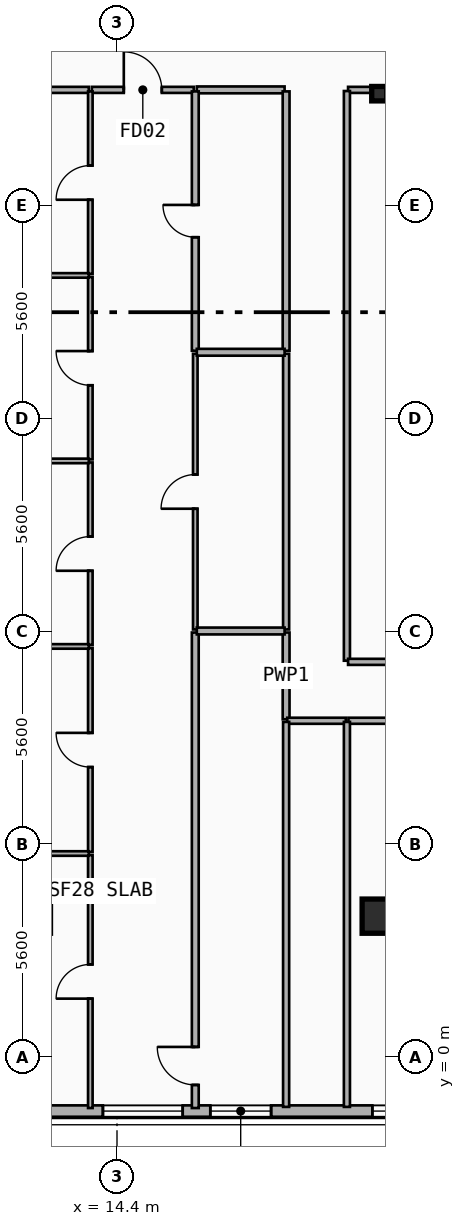
"""IFC4 building model, lengths in metres.
Left out: names, types, materials, properties, quantities, classifications, styles, units other than length and angle.
Written with IfcOpenShell. Run it as: python <this file> out.ifc"""

import sys

from ifc_helpers import new_model, si_unit, direction, frame, frame_2d, origin, origin_2d, place, context, subcontext, project, spatial, rectangle, i_section, extrude, element, fill, save


model = new_model("IFC4")
c1 = context("Model", 3, precision=1e-05, world=origin(), true_north=direction((0.0, 1.0)))
c2 = subcontext(c1, "Body", "Model", "MODEL_VIEW")
j1 = project(units=[si_unit("LENGTHUNIT", "METRE"), si_unit("PLANEANGLEUNIT", "RADIAN")], contexts=[c1])
p1 = place(None, origin())
s1 = spatial("IfcSite", under=j1, at=p1, CompositionType="ELEMENT")
p2 = place(p1, origin())
s2 = spatial("IfcBuilding", under=s1, at=p2, CompositionType="ELEMENT")
p3 = place(p2, frame((0.0, 0.0, 247.3)))
s3 = spatial("IfcBuildingStorey", under=s2, at=p3, CompositionType="ELEMENT", Elevation=247.3)
p4 = place(p3, frame((21.3, 25.35, 0.0), z_axis=(0.0, 0.0, 1.0), x_axis=(1.0, 0.0, 0.0)))
e1 = element("IfcColumn", 1, at=p4, inside=s3, PredefinedType="COLUMN", context=c2, shape_type="SweptSolid", body=[
    extrude(i_section(OverallWidth=0.395, OverallDepth=0.38, WebThickness=0.019, FlangeThickness=0.03, FilletRadius=0.015, at=origin_2d()), origin(), (0.0, 0.0, 1.0), 3.7),
])
p5 = place(p3, frame((21.3, 3.818, 0.0), z_axis=(0.0, -0.090227632116, 0.995921168769), x_axis=(1.0, 0.0, 0.0)))
e2 = element("IfcColumn", 2, at=p5, inside=s3, PredefinedType="COLUMN", context=c2, shape_type="SweptSolid", body=[
    extrude(rectangle(XDim=0.9, YDim=0.9, at=origin_2d()), origin(), (0.0, 0.0, 1.0), 3.715),
])
p6 = place(p3, frame((45.2, -1.42, 0.0), z_axis=(0.0, 0.0, 1.0), x_axis=(-1.0, 0.0, 0.0)))
e3 = element("IfcWall", 3, at=p6, inside=s3, PredefinedType="SOLIDWALL", context=c2, shape_type="SweptSolid", body=[
    extrude(rectangle(XDim=32.8, YDim=0.3, at=frame_2d((16.4, 0.0))), origin(), (0.0, 0.0, 1.0), 3.42),
])
p7 = place(p6, frame((29.071, 0.0, 0.75)))
e4 = element("IfcOpeningElement", 4, at=p7, cuts=e3, PredefinedType="OPENING", context=c2, shape_type="SweptSolid", body=[
    extrude(rectangle(XDim=2.1, YDim=2.1, at=frame_2d((1.05, 1.05))), frame((0.0, 0.16, 0.0), z_axis=(0.0, -1.0, 0.0), x_axis=(1.0, 0.0, 0.0)), (0.0, 0.0, 1.0), 0.32),
])
p8 = place(p6, frame((26.745, 0.0, 0.75)))
e5 = element("IfcOpeningElement", 5, at=p8, cuts=e3, PredefinedType="OPENING", context=c2, shape_type="SweptSolid", body=[
    extrude(rectangle(XDim=1.6, YDim=1.95, at=frame_2d((0.8, 0.975))), frame((0.0, 0.16, 0.0), z_axis=(0.0, -1.0, 0.0), x_axis=(1.0, 0.0, 0.0)), (0.0, 0.0, 1.0), 0.32),
])
p9 = place(p6, frame((21.981, 0.0, 0.75)))
e6 = element("IfcOpeningElement", 6, at=p9, cuts=e3, PredefinedType="OPENING", context=c2, shape_type="SweptSolid", body=[
    extrude(rectangle(XDim=2.1, YDim=2.1, at=frame_2d((1.05, 1.05))), frame((0.0, 0.16, 0.0), z_axis=(0.0, -1.0, 0.0), x_axis=(1.0, 0.0, 0.0)), (0.0, 0.0, 1.0), 0.32),
])
p10 = place(p6, frame((18.324, 0.0, 0.75)))
e7 = element("IfcOpeningElement", 7, at=p10, cuts=e3, PredefinedType="OPENING", context=c2, shape_type="SweptSolid", body=[
    extrude(rectangle(XDim=2.1, YDim=2.1, at=frame_2d((1.05, 1.05))), frame((0.0, 0.16, 0.0), z_axis=(0.0, -1.0, 0.0), x_axis=(1.0, 0.0, 0.0)), (0.0, 0.0, 1.0), 0.32),
])
p11 = place(p6, frame((11.364, 0.0, 0.75)))
e8 = element("IfcOpeningElement", 8, at=p11, cuts=e3, PredefinedType="OPENING", context=c2, shape_type="SweptSolid", body=[
    extrude(rectangle(XDim=2.1, YDim=2.1, at=frame_2d((1.05, 1.05))), frame((0.0, 0.16, 0.0), z_axis=(0.0, -1.0, 0.0), x_axis=(1.0, 0.0, 0.0)), (0.0, 0.0, 1.0), 0.32),
])
p12 = place(p6, frame((9.238, 0.0, 0.68)))
e9 = element("IfcOpeningElement", 9, at=p12, cuts=e3, PredefinedType="OPENING", context=c2, shape_type="SweptSolid", body=[
    extrude(rectangle(XDim=1.2, YDim=1.5, at=frame_2d((0.6, 0.75))), frame((0.0, 0.16, 0.0), z_axis=(0.0, -1.0, 0.0), x_axis=(1.0, 0.0, 0.0)), (0.0, 0.0, 1.0), 0.32),
])
p13 = place(p6, frame((14.669, 0.0, 0.75)))
e10 = element("IfcOpeningElement", 10, at=p13, cuts=e3, PredefinedType="OPENING", context=c2, shape_type="SweptSolid", body=[
    extrude(rectangle(XDim=2.1, YDim=2.1, at=frame_2d((1.05, 1.05))), frame((0.0, 0.16, 0.0), z_axis=(0.0, -1.0, 0.0), x_axis=(1.0, 0.0, 0.0)), (0.0, 0.0, 1.0), 0.32),
])
p14 = place(p6, frame((1.937, 0.0, 0.75)))
e11 = element("IfcOpeningElement", 11, at=p14, cuts=e3, PredefinedType="OPENING", context=c2, shape_type="SweptSolid", body=[
    extrude(rectangle(XDim=2.1, YDim=2.1, at=frame_2d((1.05, 1.05))), frame((0.0, 0.16, 0.0), z_axis=(0.0, -1.0, 0.0), x_axis=(1.0, 0.0, 0.0)), (0.0, 0.0, 1.0), 0.32),
])
p15 = place(p6, frame((4.709, 0.0, 0.8)))
e12 = element("IfcOpeningElement", 12, at=p15, cuts=e3, PredefinedType="OPENING", context=c2, shape_type="SweptSolid", body=[
    extrude(rectangle(XDim=1.8, YDim=1.8, at=frame_2d((0.9, 0.9))), frame((0.0, 0.16, 0.0), z_axis=(0.0, -1.0, 0.0), x_axis=(1.0, 0.0, 0.0)), (0.0, 0.0, 1.0), 0.32),
])
p16 = place(p3, frame((13.738, 25.45, 0.0), z_axis=(0.0, 0.0, 1.0), x_axis=(1.0, 0.0, 0.0)))
e13 = element("IfcWall", 13, at=p16, inside=s3, PredefinedType="PARTITIONING", context=c2, shape_type="SweptSolid", body=[
    extrude(rectangle(XDim=2.682, YDim=0.16, at=frame_2d((1.341, 0.0))), origin(), (0.0, 0.0, 1.0), 3.42),
])
p17 = place(p16, frame((0.841, 0.0, 0.0)))
e14 = element("IfcOpeningElement", 14, at=p17, cuts=e13, PredefinedType="OPENING", context=c2, shape_type="SweptSolid", body=[
    extrude(rectangle(XDim=1.0, YDim=2.15, at=frame_2d((0.5, 1.075))), frame((0.0, 0.09, 0.0), z_axis=(0.0, -1.0, 0.0), x_axis=(1.0, 0.0, 0.0)), (0.0, 0.0, 1.0), 0.18),
])
p18 = place(p3, frame((16.5, 25.45, 0.0), z_axis=(0.0, 0.0, 1.0), x_axis=(1.0, 0.0, 0.0)))
e15 = element("IfcWall", 15, at=p18, inside=s3, PredefinedType="PLUMBINGWALL", context=c2, shape_type="SweptSolid", body=[
    extrude(rectangle(XDim=2.31, YDim=0.18, at=frame_2d((1.155, 0.0))), origin(), (0.0, 0.0, 1.0), 3.42),
])
p19 = place(p3, frame((8.46, 25.45, 0.0), z_axis=(0.0, 0.0, 1.0), x_axis=(1.0, 0.0, 0.0)))
e16 = element("IfcWall", 16, at=p19, inside=s3, PredefinedType="PARTITIONING", context=c2, shape_type="SweptSolid", body=[
    extrude(rectangle(XDim=5.198, YDim=0.16, at=frame_2d((2.599, 0.0))), origin(), (0.0, 0.0, 1.0), 2.7),
])
p20 = place(p3, frame((18.85, 8.89, 0.0), z_axis=(0.0, 0.0, 1.0), x_axis=(0.0, 1.0, 0.0)))
e17 = element("IfcWall", 17, at=p20, inside=s3, PredefinedType="PLUMBINGWALL", context=c2, shape_type="SweptSolid", body=[
    extrude(rectangle(XDim=2.282, YDim=0.18, at=frame_2d((1.141, 0.0))), origin(), (0.0, 0.0, 1.0), 2.9),
])
p21 = place(p3, frame((18.85, 11.252, 0.0), z_axis=(0.0, 0.0, 1.0), x_axis=(0.0, 1.0, 0.0)))
e18 = element("IfcWall", 18, at=p21, inside=s3, PredefinedType="PARTITIONING", context=c2, shape_type="SweptSolid", body=[
    extrude(rectangle(XDim=7.254, YDim=0.16, at=frame_2d((3.627, 0.0))), origin(), (0.0, 0.0, 1.0), 2.9),
])
p22 = place(p3, frame((18.85, 18.586, 0.0), z_axis=(0.0, 0.0, 1.0), x_axis=(0.0, 1.0, 0.0)))
e19 = element("IfcWall", 19, at=p22, inside=s3, PredefinedType="PLUMBINGWALL", context=c2, shape_type="SweptSolid", body=[
    extrude(rectangle(XDim=6.824, YDim=0.18, at=frame_2d((3.412, 0.0))), origin(), (0.0, 0.0, 1.0), 2.9),
])
p23 = place(p3, frame((20.49, 8.85, 0.0), z_axis=(0.0, 0.0, 1.0), x_axis=(1.0, 0.0, 0.0)))
e20 = element("IfcWall", 20, at=p23, inside=s3, PredefinedType="PARTITIONING", context=c2, shape_type="SweptSolid", body=[
    extrude(rectangle(XDim=3.358, YDim=0.16, at=frame_2d((1.679, 0.0))), origin(), (0.0, 0.0, 1.0), 2.7),
])
p24 = place(p23, frame((1.179, 0.0, 0.0)))
e21 = element("IfcOpeningElement", 21, at=p24, cuts=e20, PredefinedType="OPENING", context=c2, shape_type="SweptSolid", body=[
    extrude(rectangle(XDim=1.0, YDim=2.15, at=frame_2d((0.5, 1.075))), frame((0.0, 0.09, 0.0), z_axis=(0.0, -1.0, 0.0), x_axis=(1.0, 0.0, 0.0)), (0.0, 0.0, 1.0), 0.18),
])
p25 = place(p3, frame((16.46, -1.34, 0.0), z_axis=(0.0, 0.0, 1.0), x_axis=(0.0, 1.0, 0.0)))
e22 = element("IfcWall", 22, at=p25, inside=s3, PredefinedType="PLUMBINGWALL", context=c2, shape_type="SweptSolid", body=[
    extrude(rectangle(XDim=12.512, YDim=0.18, at=frame_2d((6.256, 0.0))), origin(), (0.0, 0.0, 1.0), 2.9),
])
p26 = place(p25, frame((0.608, 0.0, 0.0)))
e23 = element("IfcOpeningElement", 23, at=p26, cuts=e22, PredefinedType="OPENING", context=c2, shape_type="SweptSolid", body=[
    extrude(rectangle(XDim=1.0, YDim=2.15, at=frame_2d((0.5, 1.075))), frame((0.0, 0.1, 0.0), z_axis=(0.0, -1.0, 0.0), x_axis=(1.0, 0.0, 0.0)), (0.0, 0.0, 1.0), 0.2),
])
p27 = place(p3, frame((16.46, 11.252, 0.0), z_axis=(0.0, 0.0, 1.0), x_axis=(0.0, 1.0, 0.0)))
e24 = element("IfcWall", 24, at=p27, inside=s3, PredefinedType="PARTITIONING", context=c2, shape_type="SweptSolid", body=[
    extrude(rectangle(XDim=7.254, YDim=0.12, at=frame_2d((3.627, 0.0))), origin(), (0.0, 0.0, 1.0), 2.9),
])
p28 = place(p27, frame((3.177, 0.0, 0.0)))
e25 = element("IfcOpeningElement", 25, at=p28, cuts=e24, PredefinedType="OPENING", context=c2, shape_type="SweptSolid", body=[
    extrude(rectangle(XDim=0.9, YDim=2.1, at=frame_2d((0.45, 1.05))), frame((0.0, 0.07, 0.0), z_axis=(0.0, -1.0, 0.0), x_axis=(1.0, 0.0, 0.0)), (0.0, 0.0, 1.0), 0.14),
])
p29 = place(p3, frame((16.46, 18.586, 0.0), z_axis=(0.0, 0.0, 1.0), x_axis=(0.0, 1.0, 0.0)))
e26 = element("IfcWall", 26, at=p29, inside=s3, PredefinedType="PLUMBINGWALL", context=c2, shape_type="SweptSolid", body=[
    extrude(rectangle(XDim=6.824, YDim=0.18, at=frame_2d((3.412, 0.0))), origin(), (0.0, 0.0, 1.0), 2.9),
])
p30 = place(p29, frame((2.987, 0.0, 0.0)))
e27 = element("IfcOpeningElement", 27, at=p30, cuts=e26, PredefinedType="OPENING", context=c2, shape_type="SweptSolid", body=[
    extrude(rectangle(XDim=0.85, YDim=2.1, at=frame_2d((0.425, 1.05))), frame((0.0, 0.1, 0.0), z_axis=(0.0, -1.0, 0.0), x_axis=(1.0, 0.0, 0.0)), (0.0, 0.0, 1.0), 0.2),
])
p31 = place(p3, frame((13.698, -1.34, 0.0), z_axis=(0.0, 0.0, 1.0), x_axis=(0.0, 1.0, 0.0)))
e28 = element("IfcWall", 28, at=p31, inside=s3, PredefinedType="PARTITIONING", context=c2, shape_type="SweptSolid", body=[
    extrude(rectangle(XDim=6.657, YDim=0.12, at=frame_2d((3.329, 0.0))), origin(), (0.0, 0.0, 1.0), 3.08),
])
p32 = place(p31, frame((2.878, 0.0, 0.0)))
e29 = element("IfcOpeningElement", 29, at=p32, cuts=e28, PredefinedType="OPENING", context=c2, shape_type="SweptSolid", body=[
    extrude(rectangle(XDim=0.9, YDim=2.1, at=frame_2d((0.45, 1.05))), frame((0.0, 0.07, 0.0), z_axis=(0.0, -1.0, 0.0), x_axis=(1.0, 0.0, 0.0)), (0.0, 0.0, 1.0), 0.14),
])
p33 = place(p3, frame((13.698, 5.397, 0.0), z_axis=(0.0, 0.0, 1.0), x_axis=(0.0, 1.0, 0.0)))
e30 = element("IfcWall", 30, at=p33, inside=s3, PredefinedType="PARTITIONING", context=c2, shape_type="SweptSolid", body=[
    extrude(rectangle(XDim=5.369, YDim=0.12, at=frame_2d((2.685, 0.0))), origin(), (0.0, 0.0, 1.0), 3.05),
])
p34 = place(p33, frame((2.235, 0.0, 0.0)))
e31 = element("IfcOpeningElement", 31, at=p34, cuts=e30, PredefinedType="OPENING", context=c2, shape_type="SweptSolid", body=[
    extrude(rectangle(XDim=0.9, YDim=2.1, at=frame_2d((0.45, 1.05))), frame((0.0, 0.07, 0.0), z_axis=(0.0, -1.0, 0.0), x_axis=(1.0, 0.0, 0.0)), (0.0, 0.0, 1.0), 0.14),
])
p35 = place(p3, frame((13.698, 10.846, 0.0), z_axis=(0.0, 0.0, 1.0), x_axis=(0.0, 1.0, 0.0)))
e32 = element("IfcWall", 32, at=p35, inside=s3, PredefinedType="PARTITIONING", context=c2, shape_type="SweptSolid", body=[
    extrude(rectangle(XDim=4.801, YDim=0.12, at=frame_2d((2.4, 0.0))), origin(), (0.0, 0.0, 1.0), 2.9),
])
p36 = place(p35, frame((1.95, 0.0, 0.0)))
e33 = element("IfcOpeningElement", 33, at=p36, cuts=e32, PredefinedType="OPENING", context=c2, shape_type="SweptSolid", body=[
    extrude(rectangle(XDim=0.9, YDim=2.1, at=frame_2d((0.45, 1.05))), frame((0.0, 0.07, 0.0), z_axis=(0.0, -1.0, 0.0), x_axis=(1.0, 0.0, 0.0)), (0.0, 0.0, 1.0), 0.14),
])
p37 = place(p3, frame((13.698, 15.727, 0.0), z_axis=(0.0, 0.0, 1.0), x_axis=(0.0, 1.0, 0.0)))
e34 = element("IfcWall", 34, at=p37, inside=s3, PredefinedType="PARTITIONING", context=c2, shape_type="SweptSolid", body=[
    extrude(rectangle(XDim=4.801, YDim=0.12, at=frame_2d((2.4, 0.0))), origin(), (0.0, 0.0, 1.0), 2.9),
])
p38 = place(p37, frame((1.95, 0.0, 0.0)))
e35 = element("IfcOpeningElement", 35, at=p38, cuts=e34, PredefinedType="OPENING", context=c2, shape_type="SweptSolid", body=[
    extrude(rectangle(XDim=0.9, YDim=2.1, at=frame_2d((0.45, 1.05))), frame((0.0, 0.07, 0.0), z_axis=(0.0, -1.0, 0.0), x_axis=(1.0, 0.0, 0.0)), (0.0, 0.0, 1.0), 0.14),
])
p39 = place(p3, frame((13.698, 20.608, 0.0), z_axis=(0.0, 0.0, 1.0), x_axis=(0.0, 1.0, 0.0)))
e36 = element("IfcWall", 36, at=p39, inside=s3, PredefinedType="PARTITIONING", context=c2, shape_type="SweptSolid", body=[
    extrude(rectangle(XDim=4.802, YDim=0.12, at=frame_2d((2.401, 0.0))), origin(), (0.0, 0.0, 1.0), 3.05),
])
p40 = place(p39, frame((1.951, 0.0, 0.0)))
e37 = element("IfcOpeningElement", 37, at=p40, cuts=e36, PredefinedType="OPENING", context=c2, shape_type="SweptSolid", body=[
    extrude(rectangle(XDim=0.9, YDim=2.1, at=frame_2d((0.45, 1.05))), frame((0.0, 0.07, 0.0), z_axis=(0.0, -1.0, 0.0), x_axis=(1.0, 0.0, 0.0)), (0.0, 0.0, 1.0), 0.14),
])
p41 = place(p3, frame((16.5, 11.212, 0.0), z_axis=(0.0, 0.0, 1.0), x_axis=(1.0, 0.0, 0.0)))
e38 = element("IfcWall", 38, at=p41, inside=s3, PredefinedType="PLUMBINGWALL", context=c2, shape_type="SweptSolid", body=[
    extrude(rectangle(XDim=2.31, YDim=0.18, at=frame_2d((1.155, 0.0))), origin(), (0.0, 0.0, 1.0), 2.9),
])
p42 = place(p3, frame((16.5, 18.546, 0.0), z_axis=(0.0, 0.0, 1.0), x_axis=(1.0, 0.0, 0.0)))
e39 = element("IfcWall", 39, at=p42, inside=s3, PredefinedType="PLUMBINGWALL", context=c2, shape_type="SweptSolid", body=[
    extrude(rectangle(XDim=2.31, YDim=0.18, at=frame_2d((1.155, 0.0))), origin(), (0.0, 0.0, 1.0), 3.42),
])
for number, where, z_axis, x_axis in (
    (40, (8.46, 5.357, 0.0), (0.0, 0.0, 1.0), (1.0, 0.0, 0.0)),
    (41, (8.46, 10.806, 0.0), (0.0, 0.0, 1.0), (1.0, 0.0, 0.0)),
    (42, (8.46, 15.687, 0.0), (0.0, 0.0, 1.0), (1.0, 0.0, 0.0)),
    (43, (8.46, 20.568, 0.0), (0.0, 0.0, 1.0), (1.0, 0.0, 0.0)),
):
    element("IfcWall", number, at=place(p3, frame(where, z_axis=z_axis, x_axis=x_axis)), inside=s3, PredefinedType="PARTITIONING", context=c2, shape_type="SweptSolid", body=[
        extrude(rectangle(XDim=5.198, YDim=0.12, at=frame_2d((2.599, 0.0))), origin(), (0.0, 0.0, 1.0), 2.7),
    ])
p43 = place(p3, frame((20.48, 25.45, 0.0), z_axis=(0.0, 0.0, 1.0), x_axis=(1.0, 0.0, 0.0)))
e44 = element("IfcWall", 44, at=p43, inside=s3, PredefinedType="PARTITIONING", context=c2, shape_type="SweptSolid", body=[
    extrude(rectangle(XDim=15.84, YDim=0.16, at=frame_2d((7.92, 0.0))), origin(), (0.0, 0.0, 1.0), 2.7),
])
p44 = place(p3, frame((18.88, 8.85, 0.0), z_axis=(0.0, 0.0, 1.0), x_axis=(1.0, 0.0, 0.0)))
e45 = element("IfcWall", 45, at=p44, inside=s3, PredefinedType="PARTITIONING", context=c2, shape_type="SweptSolid", body=[
    extrude(rectangle(XDim=1.54, YDim=0.16, at=frame_2d((0.77, 0.0))), origin(), (0.0, 0.0, 1.0), 3.42),
])
p45 = place(p3, frame((20.45, 10.43, 0.0), z_axis=(0.0, 0.0, 1.0), x_axis=(0.0, 1.0, 0.0)))
e46 = element("IfcWall", 46, at=p45, inside=s3, PredefinedType="PARTITIONING", context=c2, shape_type="SweptSolid", body=[
    extrude(rectangle(XDim=14.99, YDim=0.16, at=frame_2d((7.495, 0.0))), origin(), (0.0, 0.0, 1.0), 2.9),
])
p46 = place(p3, frame((20.48, 10.4, 0.0), z_axis=(0.0, 0.0, 1.0), x_axis=(1.0, 0.0, 0.0)))
e47 = element("IfcWall", 47, at=p46, inside=s3, PredefinedType="PARTITIONING", context=c2, shape_type="SweptSolid", body=[
    extrude(rectangle(XDim=2.64, YDim=0.16, at=frame_2d((1.32, 0.0))), origin(), (0.0, 0.0, 1.0), 2.7),
])
for number, where, z_axis, x_axis in (
    (48, (18.85, -1.31, 0.0), (0.0, 0.0, 1.0), (0.0, 1.0, 0.0)),
    (49, (20.45, -1.31, 0.0), (0.0, 0.0, 1.0), (0.0, 1.0, 0.0)),
):
    element("IfcWall", number, at=place(p3, frame(where, z_axis=z_axis, x_axis=x_axis)), inside=s3, PredefinedType="PARTITIONING", context=c2, shape_type="SweptSolid", body=[
        extrude(rectangle(XDim=10.13, YDim=0.16, at=frame_2d((5.065, 0.0))), origin(), (0.0, 0.0, 1.0), 3.05),
    ])
p47 = place(p7, origin())
e50 = element("IfcWindow", 50, at=p47, inside=s3, PartitioningType="SINGLE_PANEL", PredefinedType="WINDOW", context=c2, shape_type="SweptSolid", body=[
    extrude(rectangle(XDim=2.1, YDim=2.1, at=frame_2d((1.05, 1.05))), frame((0.0, 0.03, 0.0), z_axis=(0.0, -1.0, 0.0), x_axis=(1.0, 0.0, 0.0)), (0.0, 0.0, 1.0), 0.06),
])
fill(e4, e50)
p48 = place(p8, origin())
e51 = element("IfcWindow", 51, at=p48, inside=s3, PartitioningType="SINGLE_PANEL", PredefinedType="WINDOW", context=c2, shape_type="SweptSolid", body=[
    extrude(rectangle(XDim=1.6, YDim=1.95, at=frame_2d((0.8, 0.975))), frame((0.0, 0.03, 0.0), z_axis=(0.0, -1.0, 0.0), x_axis=(1.0, 0.0, 0.0)), (0.0, 0.0, 1.0), 0.06),
])
fill(e5, e51)
p49 = place(p9, origin())
e52 = element("IfcWindow", 52, at=p49, inside=s3, PartitioningType="SINGLE_PANEL", PredefinedType="WINDOW", context=c2, shape_type="SweptSolid", body=[
    extrude(rectangle(XDim=2.1, YDim=2.1, at=frame_2d((1.05, 1.05))), frame((0.0, 0.03, 0.0), z_axis=(0.0, -1.0, 0.0), x_axis=(1.0, 0.0, 0.0)), (0.0, 0.0, 1.0), 0.06),
])
fill(e6, e52)
p50 = place(p17, origin())
e53 = element("IfcDoor", 53, at=p50, inside=s3, OperationType="SINGLE_SWING_LEFT", PredefinedType="DOOR", context=c2, shape_type="SweptSolid", body=[
    extrude(rectangle(XDim=1.0, YDim=2.15, at=frame_2d((0.5, 1.075))), frame((0.0, 0.025, 0.0), z_axis=(0.0, -1.0, 0.0), x_axis=(1.0, 0.0, 0.0)), (0.0, 0.0, 1.0), 0.05),
])
fill(e14, e53)
p51 = place(p26, origin())
e54 = element("IfcDoor", 54, at=p51, inside=s3, OperationType="SINGLE_SWING_RIGHT", PredefinedType="DOOR", context=c2, shape_type="SweptSolid", body=[
    extrude(rectangle(XDim=1.0, YDim=2.15, at=frame_2d((0.5, 1.075))), frame((0.0, 0.025, 0.0), z_axis=(0.0, -1.0, 0.0), x_axis=(1.0, 0.0, 0.0)), (0.0, 0.0, 1.0), 0.05),
])
fill(e23, e54)
p52 = place(p28, origin())
e55 = element("IfcDoor", 55, at=p52, inside=s3, OperationType="SINGLE_SWING_LEFT", PredefinedType="DOOR", context=c2, shape_type="SweptSolid", body=[
    extrude(rectangle(XDim=0.9, YDim=2.1, at=frame_2d((0.45, 1.05))), frame((0.0, 0.025, 0.0), z_axis=(0.0, -1.0, 0.0), x_axis=(1.0, 0.0, 0.0)), (0.0, 0.0, 1.0), 0.05),
])
fill(e25, e55)
p53 = place(p30, origin())
e56 = element("IfcDoor", 56, at=p53, inside=s3, OperationType="SINGLE_SWING_RIGHT", PredefinedType="DOOR", context=c2, shape_type="SweptSolid", body=[
    extrude(rectangle(XDim=0.85, YDim=2.1, at=frame_2d((0.425, 1.05))), frame((0.0, 0.025, 0.0), z_axis=(0.0, -1.0, 0.0), x_axis=(1.0, 0.0, 0.0)), (0.0, 0.0, 1.0), 0.05),
])
fill(e27, e56)
p54 = place(p32, origin())
e57 = element("IfcDoor", 57, at=p54, inside=s3, OperationType="SINGLE_SWING_LEFT", PredefinedType="DOOR", context=c2, shape_type="SweptSolid", body=[
    extrude(rectangle(XDim=0.9, YDim=2.1, at=frame_2d((0.45, 1.05))), frame((0.0, 0.025, 0.0), z_axis=(0.0, -1.0, 0.0), x_axis=(1.0, 0.0, 0.0)), (0.0, 0.0, 1.0), 0.05),
])
fill(e29, e57)
p55 = place(p34, origin())
e58 = element("IfcDoor", 58, at=p55, inside=s3, OperationType="SINGLE_SWING_RIGHT", PredefinedType="DOOR", context=c2, shape_type="SweptSolid", body=[
    extrude(rectangle(XDim=0.9, YDim=2.1, at=frame_2d((0.45, 1.05))), frame((0.0, 0.025, 0.0), z_axis=(0.0, -1.0, 0.0), x_axis=(1.0, 0.0, 0.0)), (0.0, 0.0, 1.0), 0.05),
])
fill(e31, e58)
p56 = place(p36, origin())
e59 = element("IfcDoor", 59, at=p56, inside=s3, OperationType="SINGLE_SWING_LEFT", PredefinedType="DOOR", context=c2, shape_type="SweptSolid", body=[
    extrude(rectangle(XDim=0.9, YDim=2.1, at=frame_2d((0.45, 1.05))), frame((0.0, 0.025, 0.0), z_axis=(0.0, -1.0, 0.0), x_axis=(1.0, 0.0, 0.0)), (0.0, 0.0, 1.0), 0.05),
])
fill(e33, e59)
p57 = place(p38, origin())
e60 = element("IfcDoor", 60, at=p57, inside=s3, OperationType="SINGLE_SWING_RIGHT", PredefinedType="DOOR", context=c2, shape_type="SweptSolid", body=[
    extrude(rectangle(XDim=0.9, YDim=2.1, at=frame_2d((0.45, 1.05))), frame((0.0, 0.025, 0.0), z_axis=(0.0, -1.0, 0.0), x_axis=(1.0, 0.0, 0.0)), (0.0, 0.0, 1.0), 0.05),
])
fill(e35, e60)
p58 = place(p40, origin())
e61 = element("IfcDoor", 61, at=p58, inside=s3, OperationType="SINGLE_SWING_LEFT", PredefinedType="DOOR", context=c2, shape_type="SweptSolid", body=[
    extrude(rectangle(XDim=0.9, YDim=2.1, at=frame_2d((0.45, 1.05))), frame((0.0, 0.025, 0.0), z_axis=(0.0, -1.0, 0.0), x_axis=(1.0, 0.0, 0.0)), (0.0, 0.0, 1.0), 0.05),
])
fill(e37, e61)
save(model, sys.argv[1])
